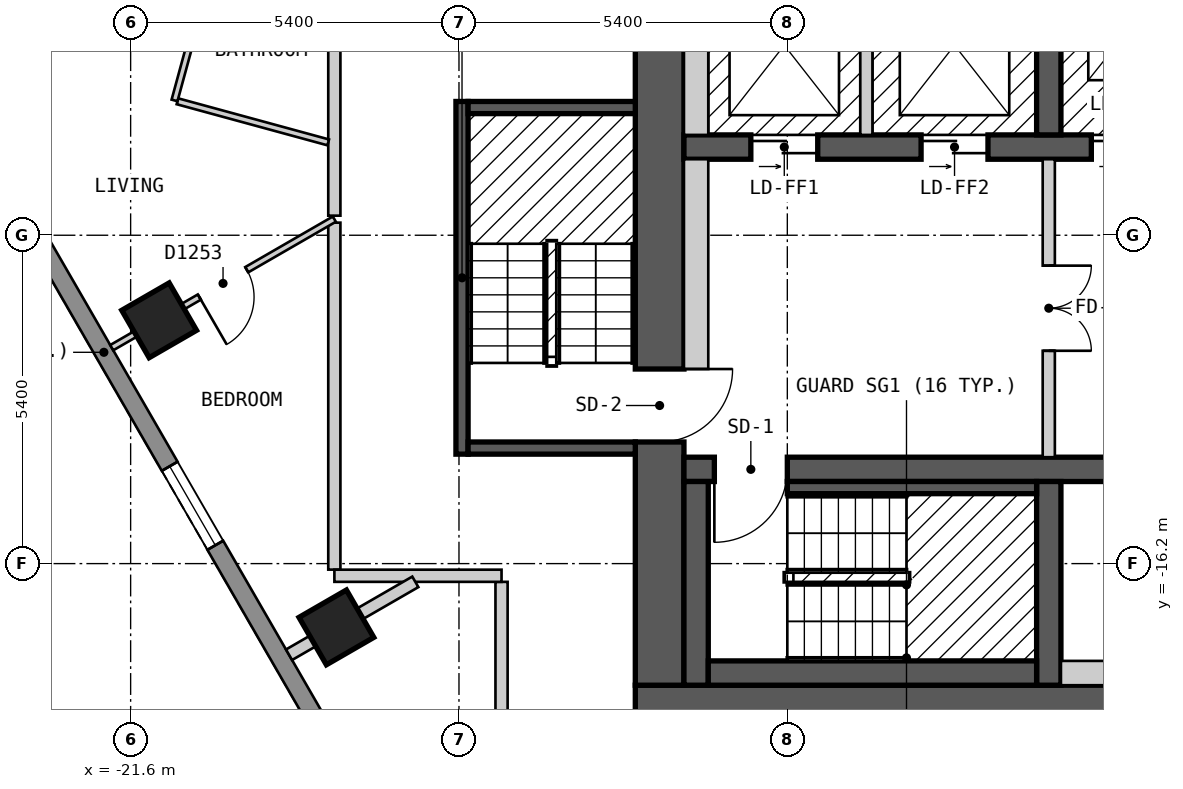
"""IFC4 building model, lengths in metres.
Left out: names, types, materials, properties, quantities, classifications, styles, units other than length and angle.
Written with IfcOpenShell. Run it as: python <this file> out.ifc"""

import sys

from ifc_helpers import new_model, si_unit, direction, frame, frame_2d, origin, origin_2d, place, context, subcontext, project, spatial, polyline, rectangle, outline, extrude, element, fill, save


model = new_model("IFC4")
c1 = context("Model", 3, precision=1e-05, world=origin(), true_north=direction((0.0, 1.0)))
c2 = subcontext(c1, "Body", "Model", "MODEL_VIEW")
j1 = project(units=[si_unit("LENGTHUNIT", "METRE"), si_unit("PLANEANGLEUNIT", "RADIAN")], contexts=[c1])
p1 = place(None, origin())
s1 = spatial("IfcSite", under=j1, at=p1, CompositionType="ELEMENT")
p2 = place(p1, origin())
s2 = spatial("IfcBuilding", under=s1, at=p2, CompositionType="ELEMENT")
p3 = place(p2, frame((0.0, 0.0, 129.6)))
s3 = spatial("IfcBuildingStorey", under=s2, at=p3, CompositionType="ELEMENT", Elevation=129.6)
for number, where, z_axis, x_axis in (
    (1, (-21.131, -12.199, 0.0), (0.0, 0.0, 1.0), (0.5, -0.866, 0.0)),
    (2, (-18.216, -17.249, 0.0), (0.0, 0.0, 1.0), (0.5, -0.866, 0.0)),
):
    element("IfcColumn", number, at=place(p3, frame(where, z_axis=z_axis, x_axis=x_axis)), inside=s3, PredefinedType="COLUMN", context=c2, shape_type="SweptSolid", body=[
        extrude(rectangle(XDim=0.9, YDim=0.9, at=origin_2d()), origin(), (0.0, 0.0, 1.0), 3.0),
    ])
p4 = place(p3, frame((-13.3, -18.6, 0.0), z_axis=(0.0, 0.0, 1.0), x_axis=(1.0, 0.0, 0.0)))
e3 = element("IfcWall", 3, at=p4, inside=s3, PredefinedType="SHEAR", context=c2, shape_type="SweptSolid", body=[
    extrude(rectangle(XDim=26.6, YDim=0.8, at=frame_2d((13.3, 0.0))), origin(), (0.0, 0.0, 1.0), 2.7),
])
p5 = place(p3, frame((-12.9, -18.2, 0.0), z_axis=(0.0, 0.0, 1.0), x_axis=(0.0, 1.0, 0.0)))
e4 = element("IfcWall", 4, at=p5, inside=s3, PredefinedType="SHEAR", context=c2, shape_type="SweptSolid", body=[
    extrude(rectangle(XDim=12.4, YDim=0.8, at=frame_2d((6.2, 0.0))), origin(), (0.0, 0.0, 1.0), 2.7),
])
p6 = place(p5, frame((4.0, 0.0, 0.0)))
e5 = element("IfcOpeningElement", 5, at=p6, cuts=e4, PredefinedType="OPENING", context=c2, shape_type="SweptSolid", body=[
    extrude(rectangle(XDim=1.2, YDim=2.1, at=frame_2d((0.6, 1.05))), frame((0.0, 0.41, 0.0), z_axis=(0.0, -1.0, 0.0), x_axis=(1.0, 0.0, 0.0)), (0.0, 0.0, 1.0), 0.82),
])
p7 = place(p3, frame((-12.5, -14.65, 0.0), z_axis=(0.0, 0.0, 1.0), x_axis=(1.0, 0.0, 0.0)))
e6 = element("IfcWall", 6, at=p7, inside=s3, PredefinedType="SHEAR", context=c2, shape_type="SweptSolid", body=[
    extrude(rectangle(XDim=25.0, YDim=0.4, at=frame_2d((12.5, 0.0))), origin(), (0.0, 0.0, 1.0), 2.7),
])
p8 = place(p7, frame((1.7, 0.0, 0.0), z_axis=(0.0, 0.0, 1.0), x_axis=(-1.0, 0.0, 0.0)))
e7 = element("IfcOpeningElement", 7, at=p8, cuts=e6, PredefinedType="OPENING", context=c2, shape_type="SweptSolid", body=[
    extrude(rectangle(XDim=1.2, YDim=2.1, at=frame_2d((0.6, 1.05))), frame((0.0, 0.21, 0.0), z_axis=(0.0, -1.0, 0.0), x_axis=(1.0, 0.0, 0.0)), (0.0, 0.0, 1.0), 0.42),
])
p9 = place(p7, frame((24.55, 0.0, 0.0), z_axis=(0.0, 0.0, 1.0), x_axis=(-1.0, 0.0, 0.0)))
e8 = element("IfcOpeningElement", 8, at=p9, cuts=e6, PredefinedType="OPENING", context=c2, shape_type="SweptSolid", body=[
    extrude(rectangle(XDim=1.2, YDim=2.1, at=frame_2d((0.6, 1.05))), frame((0.0, 0.21, 0.0), z_axis=(0.0, -1.0, 0.0), x_axis=(1.0, 0.0, 0.0)), (0.0, 0.0, 1.0), 0.42),
])
p10 = place(p7, frame((8.4, 0.0, 0.0), z_axis=(0.0, 0.0, 1.0), x_axis=(-1.0, 0.0, 0.0)))
e9 = element("IfcOpeningElement", 9, at=p10, cuts=e6, PredefinedType="OPENING", context=c2, shape_type="SweptSolid", body=[
    extrude(rectangle(XDim=1.0, YDim=2.1, at=frame_2d((0.5, 1.05))), frame((0.0, 0.21, 0.0), z_axis=(0.0, -1.0, 0.0), x_axis=(1.0, 0.0, 0.0)), (0.0, 0.0, 1.0), 0.42),
])
p11 = place(p7, frame((11.15, 0.0, 0.0), z_axis=(0.0, 0.0, 1.0), x_axis=(-1.0, 0.0, 0.0)))
e10 = element("IfcOpeningElement", 10, at=p11, cuts=e6, PredefinedType="OPENING", context=c2, shape_type="SweptSolid", body=[
    extrude(rectangle(XDim=0.9, YDim=2.1, at=frame_2d((0.45, 1.05))), frame((0.0, 0.21, 0.0), z_axis=(0.0, -1.0, 0.0), x_axis=(1.0, 0.0, 0.0)), (0.0, 0.0, 1.0), 0.42),
])
p12 = place(p7, frame((13.95, 0.0, 0.0), z_axis=(0.0, 0.0, 1.0), x_axis=(-1.0, 0.0, 0.0)))
e11 = element("IfcOpeningElement", 11, at=p12, cuts=e6, PredefinedType="OPENING", context=c2, shape_type="SweptSolid", body=[
    extrude(rectangle(XDim=1.0, YDim=2.1, at=frame_2d((0.5, 1.05))), frame((0.0, 0.21, 0.0), z_axis=(0.0, -1.0, 0.0), x_axis=(1.0, 0.0, 0.0)), (0.0, 0.0, 1.0), 0.42),
])
p13 = place(p7, frame((17.55, 0.0, 0.0), z_axis=(0.0, 0.0, 1.0), x_axis=(-1.0, 0.0, 0.0)))
e12 = element("IfcOpeningElement", 12, at=p13, cuts=e6, PredefinedType="OPENING", context=c2, shape_type="SweptSolid", body=[
    extrude(rectangle(XDim=1.0, YDim=2.1, at=frame_2d((0.5, 1.05))), frame((0.0, 0.21, 0.0), z_axis=(0.0, -1.0, 0.0), x_axis=(1.0, 0.0, 0.0)), (0.0, 0.0, 1.0), 0.42),
])
p14 = place(p3, frame((-12.5, -9.35, 0.0), z_axis=(0.0, 0.0, 1.0), x_axis=(1.0, 0.0, 0.0)))
e13 = element("IfcWall", 13, at=p14, inside=s3, PredefinedType="SHEAR", context=c2, shape_type="SweptSolid", body=[
    extrude(rectangle(XDim=22.7, YDim=0.4, at=frame_2d((11.35, 0.0))), origin(), (0.0, 0.0, 1.0), 2.7),
])
p15 = place(p14, frame((1.1, 0.0, 0.0)))
e14 = element("IfcOpeningElement", 14, at=p15, cuts=e13, PredefinedType="OPENING", context=c2, shape_type="SweptSolid", body=[
    extrude(rectangle(XDim=1.1, YDim=2.1, at=frame_2d((0.55, 1.05))), frame((0.0, 0.21, 0.0), z_axis=(0.0, -1.0, 0.0), x_axis=(1.0, 0.0, 0.0)), (0.0, 0.0, 1.0), 0.42),
])
p16 = place(p14, frame((3.9, 0.0, 0.0)))
e15 = element("IfcOpeningElement", 15, at=p16, cuts=e13, PredefinedType="OPENING", context=c2, shape_type="SweptSolid", body=[
    extrude(rectangle(XDim=1.1, YDim=2.1, at=frame_2d((0.55, 1.05))), frame((0.0, 0.21, 0.0), z_axis=(0.0, -1.0, 0.0), x_axis=(1.0, 0.0, 0.0)), (0.0, 0.0, 1.0), 0.42),
])
p17 = place(p14, frame((6.7, 0.0, 0.0)))
e16 = element("IfcOpeningElement", 16, at=p17, cuts=e13, PredefinedType="OPENING", context=c2, shape_type="SweptSolid", body=[
    extrude(rectangle(XDim=1.1, YDim=2.1, at=frame_2d((0.55, 1.05))), frame((0.0, 0.21, 0.0), z_axis=(0.0, -1.0, 0.0), x_axis=(1.0, 0.0, 0.0)), (0.0, 0.0, 1.0), 0.42),
])
p18 = place(p14, frame((9.0, 0.0, 0.0)))
e17 = element("IfcOpeningElement", 17, at=p18, cuts=e13, PredefinedType="OPENING", context=c2, shape_type="SweptSolid", body=[
    extrude(rectangle(XDim=1.1, YDim=2.1, at=frame_2d((0.55, 1.05))), frame((0.0, 0.21, 0.0), z_axis=(0.0, -1.0, 0.0), x_axis=(1.0, 0.0, 0.0)), (0.0, 0.0, 1.0), 0.42),
])
p19 = place(p14, frame((11.3, 0.0, 0.0)))
e18 = element("IfcOpeningElement", 18, at=p19, cuts=e13, PredefinedType="OPENING", context=c2, shape_type="SweptSolid", body=[
    extrude(rectangle(XDim=1.1, YDim=2.1, at=frame_2d((0.55, 1.05))), frame((0.0, 0.21, 0.0), z_axis=(0.0, -1.0, 0.0), x_axis=(1.0, 0.0, 0.0)), (0.0, 0.0, 1.0), 0.42),
])
p20 = place(p14, frame((13.6, 0.0, 0.0)))
e19 = element("IfcOpeningElement", 19, at=p20, cuts=e13, PredefinedType="OPENING", context=c2, shape_type="SweptSolid", body=[
    extrude(rectangle(XDim=1.1, YDim=2.1, at=frame_2d((0.55, 1.05))), frame((0.0, 0.21, 0.0), z_axis=(0.0, -1.0, 0.0), x_axis=(1.0, 0.0, 0.0)), (0.0, 0.0, 1.0), 0.42),
])
p21 = place(p14, frame((15.9, 0.0, 0.0)))
e20 = element("IfcOpeningElement", 20, at=p21, cuts=e13, PredefinedType="OPENING", context=c2, shape_type="SweptSolid", body=[
    extrude(rectangle(XDim=1.1, YDim=2.1, at=frame_2d((0.55, 1.05))), frame((0.0, 0.21, 0.0), z_axis=(0.0, -1.0, 0.0), x_axis=(1.0, 0.0, 0.0)), (0.0, 0.0, 1.0), 0.42),
])
p22 = place(p14, frame((18.2, 0.0, 0.0)))
e21 = element("IfcOpeningElement", 21, at=p22, cuts=e13, PredefinedType="OPENING", context=c2, shape_type="SweptSolid", body=[
    extrude(rectangle(XDim=1.1, YDim=2.1, at=frame_2d((0.55, 1.05))), frame((0.0, 0.21, 0.0), z_axis=(0.0, -1.0, 0.0), x_axis=(1.0, 0.0, 0.0)), (0.0, 0.0, 1.0), 0.42),
])
p23 = place(p14, frame((20.6, 0.0, 0.0)))
e22 = element("IfcOpeningElement", 22, at=p23, cuts=e13, PredefinedType="OPENING", context=c2, shape_type="SweptSolid", body=[
    extrude(rectangle(XDim=1.1, YDim=2.1, at=frame_2d((0.55, 1.05))), frame((0.0, 0.21, 0.0), z_axis=(0.0, -1.0, 0.0), x_axis=(1.0, 0.0, 0.0)), (0.0, 0.0, 1.0), 0.42),
])
for number, where, z_axis, x_axis in (
    (23, (-6.5, -18.2, 0.0), (0.0, 0.0, 1.0), (0.0, 1.0, 0.0)),
    (24, (-6.5, -9.15, 0.0), (0.0, 0.0, 1.0), (0.0, 1.0, 0.0)),
):
    element("IfcWall", number, at=place(p3, frame(where, z_axis=z_axis, x_axis=x_axis)), inside=s3, PredefinedType="SHEAR", context=c2, shape_type="SweptSolid", body=[
        extrude(rectangle(XDim=3.35, YDim=0.4, at=frame_2d((1.675, 0.0))), origin(), (0.0, 0.0, 1.0), 2.7),
    ])
p24 = place(p3, frame((-28.218, -2.025, 0.0), z_axis=(0.0, 0.0, 1.0), x_axis=(0.500017503135, -0.866015298109, 0.0)))
e25 = element("IfcWall", 25, at=p24, inside=s3, PredefinedType="SOLIDWALL", context=c2, shape_type="SweptSolid", body=[
    extrude(outline(polyline([(0.0, -0.15), (24.711, -0.15), (24.631, 0.15), (0.08, 0.15), (0.0, -0.15)])), origin(), (0.0, 0.0, 1.0), 2.7),
])
p25 = place(p24, frame((2.857, 0.0, 0.15)))
e26 = element("IfcOpeningElement", 26, at=p25, cuts=e25, PredefinedType="OPENING", context=c2, shape_type="SweptSolid", body=[
    extrude(rectangle(XDim=1.5, YDim=2.1, at=frame_2d((0.75, 1.05))), frame((0.0, 0.16, 0.0), z_axis=(0.0, -1.0, 0.0), x_axis=(1.0, 0.0, 0.0)), (0.0, 0.0, 1.0), 0.32),
])
p26 = place(p24, frame((8.689, 0.0, 0.15)))
e27 = element("IfcOpeningElement", 27, at=p26, cuts=e25, PredefinedType="OPENING", context=c2, shape_type="SweptSolid", body=[
    extrude(rectangle(XDim=1.5, YDim=2.1, at=frame_2d((0.75, 1.05))), frame((0.0, 0.16, 0.0), z_axis=(0.0, -1.0, 0.0), x_axis=(1.0, 0.0, 0.0)), (0.0, 0.0, 1.0), 0.32),
])
p27 = place(p24, frame((14.52, 0.0, 0.15)))
e28 = element("IfcOpeningElement", 28, at=p27, cuts=e25, PredefinedType="OPENING", context=c2, shape_type="SweptSolid", body=[
    extrude(rectangle(XDim=1.5, YDim=2.1, at=frame_2d((0.75, 1.05))), frame((0.0, 0.16, 0.0), z_axis=(0.0, -1.0, 0.0), x_axis=(1.0, 0.0, 0.0)), (0.0, 0.0, 1.0), 0.32),
])
p28 = place(p24, frame((20.351, 0.0, 0.15)))
e29 = element("IfcOpeningElement", 29, at=p28, cuts=e25, PredefinedType="OPENING", context=c2, shape_type="SweptSolid", body=[
    extrude(rectangle(XDim=1.5, YDim=2.1, at=frame_2d((0.75, 1.05))), frame((0.0, 0.16, 0.0), z_axis=(0.0, -1.0, 0.0), x_axis=(1.0, 0.0, 0.0)), (0.0, 0.0, 1.0), 0.32),
])
p29 = place(p3, frame((-15.5, -16.5, 0.0), z_axis=(0.0, 0.0, 1.0), x_axis=(0.0, -1.0, 0.0)))
e30 = element("IfcWall", 30, at=p29, inside=s3, PredefinedType="PARTITIONING", context=c2, shape_type="SweptSolid", body=[
    extrude(rectangle(XDim=4.599, YDim=0.2, at=frame_2d((2.3, 0.0))), origin(), (0.0, 0.0, 1.0), 2.7),
])
p30 = place(p3, frame((-18.25, -10.593, 0.0), z_axis=(0.0, 0.0, 1.0), x_axis=(0.0, -1.0, 0.0)))
e31 = element("IfcWall", 31, at=p30, inside=s3, PredefinedType="PARTITIONING", context=c2, shape_type="SweptSolid", body=[
    extrude(rectangle(XDim=5.706, YDim=0.2, at=frame_2d((2.853, 0.0))), origin(), (0.0, 0.0, 1.0), 2.7),
])
p31 = place(p3, frame((-18.249, -16.4, 0.0), z_axis=(0.0, 0.0, 1.0), x_axis=(1.0, 0.0, 0.0)))
e32 = element("IfcWall", 32, at=p31, inside=s3, PredefinedType="PARTITIONING", context=c2, shape_type="SweptSolid", body=[
    extrude(rectangle(XDim=2.749, YDim=0.2, at=frame_2d((1.375, 0.0))), origin(), (0.0, 0.0, 1.0), 2.7),
])
p32 = place(p3, frame((-18.25, -10.478, 0.0), z_axis=(0.0, 0.0, 1.0), x_axis=(0.0, 1.0, 0.0)))
e33 = element("IfcWall", 33, at=p32, inside=s3, PredefinedType="PARTITIONING", context=c2, shape_type="SweptSolid", body=[
    extrude(rectangle(XDim=3.878, YDim=0.2, at=frame_2d((1.939, 0.0))), origin(), (0.0, 0.0, 1.0), 2.7),
])
p33 = place(p3, frame((-20.83, -8.597, 0.0), z_axis=(0.0, 0.0, 1.0), x_axis=(0.964796691053, -0.262996853468, 0.0)))
e34 = element("IfcWall", 34, at=p33, inside=s3, PredefinedType="PARTITIONING", context=c2, shape_type="SweptSolid", body=[
    extrude(rectangle(XDim=2.571, YDim=0.1, at=frame_2d((1.285, 0.0))), origin(), (0.0, 0.0, 1.0), 2.7),
])
p34 = place(p3, frame((-20.878, -8.583, 0.0), z_axis=(0.0, 0.0, 1.0), x_axis=(0.263144077993, 0.964756546605, 0.0)))
e35 = element("IfcWall", 35, at=p34, inside=s3, PredefinedType="PARTITIONING", context=c2, shape_type="SweptSolid", body=[
    extrude(rectangle(XDim=3.873, YDim=0.1, at=frame_2d((1.936, 0.0))), origin(), (0.0, 0.0, 1.0), 2.7),
])
p35 = place(p34, frame((2.552, 0.0, 0.0)))
e36 = element("IfcOpeningElement", 36, at=p35, cuts=e35, PredefinedType="OPENING", context=c2, shape_type="SweptSolid", body=[
    extrude(rectangle(XDim=0.9, YDim=2.1, at=frame_2d((0.45, 1.05))), frame((0.0, 0.06, 0.0), z_axis=(0.0, -1.0, 0.0), x_axis=(1.0, 0.0, 0.0)), (0.0, 0.0, 1.0), 0.12),
])
p36 = place(p3, frame((-21.911, -12.649, 0.0), z_axis=(0.0, 0.0, 1.0), x_axis=(0.865984571374, 0.500070717141, 0.0)))
e37 = element("IfcWall", 37, at=p36, inside=s3, PredefinedType="PARTITIONING", context=c2, shape_type="SweptSolid", body=[
    extrude(rectangle(XDim=4.228, YDim=0.1, at=frame_2d((2.114, 0.0))), origin(), (0.0, 0.0, 1.0), 2.7),
])
p37 = place(p36, frame((1.664, 0.0, 0.0)))
e38 = element("IfcOpeningElement", 38, at=p37, cuts=e37, PredefinedType="OPENING", context=c2, shape_type="SweptSolid", body=[
    extrude(rectangle(XDim=0.9, YDim=2.1, at=frame_2d((0.45, 1.05))), frame((0.0, 0.06, 0.0), z_axis=(0.0, -1.0, 0.0), x_axis=(1.0, 0.0, 0.0)), (0.0, 0.0, 1.0), 0.12),
])
p38 = place(p3, frame((-18.995, -17.699, 0.0), z_axis=(0.0, 0.0, 1.0), x_axis=(0.86607371389, 0.499916315105, 0.0)))
e39 = element("IfcWall", 39, at=p38, inside=s3, PredefinedType="PARTITIONING", context=c2, shape_type="SweptSolid", body=[
    extrude(rectangle(XDim=2.398, YDim=0.2, at=frame_2d((1.199, 0.0))), origin(), (0.0, 0.0, 1.0), 2.7),
])
p39 = place(p3, frame((-16.15, -14.4, 0.0), z_axis=(0.0, 0.0, 1.0), x_axis=(0.0, 1.0, 0.0)))
e40 = element("IfcWall", 40, at=p39, inside=s3, PredefinedType="SOLIDWALL", context=c2, shape_type="SweptSolid", body=[
    extrude(rectangle(XDim=5.8, YDim=0.2, at=frame_2d((2.9, 0.0))), origin(), (0.0, 0.0, 1.0), 2.7),
])
for number, where, z_axis, x_axis in (
    (41, (-16.05, -14.3, 0.0), (0.0, 0.0, 1.0), (1.0, 0.0, 0.0)),
    (42, (-16.05, -8.7, 0.0), (0.0, 0.0, 1.0), (1.0, 0.0, 0.0)),
):
    element("IfcWall", number, at=place(p3, frame(where, z_axis=z_axis, x_axis=x_axis)), inside=s3, PredefinedType="SOLIDWALL", context=c2, shape_type="SweptSolid", body=[
        extrude(rectangle(XDim=2.75, YDim=0.2, at=frame_2d((1.375, 0.0))), origin(), (0.0, 0.0, 1.0), 2.7),
    ])
p40 = place(p3, frame((-12.3, -18.2, 0.0), z_axis=(0.0, 0.0, 1.0), x_axis=(0.0, 1.0, 0.0)))
e43 = element("IfcWall", 43, at=p40, inside=s3, PredefinedType="SOLIDWALL", context=c2, shape_type="SweptSolid", body=[
    extrude(rectangle(XDim=3.35, YDim=0.4, at=frame_2d((1.675, 0.0))), origin(), (0.0, 0.0, 1.0), 2.7),
])
p41 = place(p3, frame((-12.3, -13.0, 0.0), z_axis=(0.0, 0.0, 1.0), x_axis=(0.0, 1.0, 0.0)))
e44 = element("IfcWall", 44, at=p41, inside=s3, PredefinedType="PARTITIONING", context=c2, shape_type="SweptSolid", body=[
    extrude(rectangle(XDim=3.45, YDim=0.4, at=frame_2d((1.725, 0.0))), origin(), (0.0, 0.0, 1.0), 2.7),
])
p42 = place(p3, frame((-12.3, -9.15, 0.0), z_axis=(0.0, 0.0, 1.0), x_axis=(0.0, 1.0, 0.0)))
e45 = element("IfcWall", 45, at=p42, inside=s3, PredefinedType="SOLIDWALL", context=c2, shape_type="SweptSolid", body=[
    extrude(rectangle(XDim=3.35, YDim=0.4, at=frame_2d((1.675, 0.0))), origin(), (0.0, 0.0, 1.0), 2.7),
])
p43 = place(p3, frame((-12.1, -18.0, 0.0), z_axis=(0.0, 0.0, 1.0), x_axis=(1.0, 0.0, 0.0)))
e46 = element("IfcWall", 46, at=p43, inside=s3, PredefinedType="SOLIDWALL", context=c2, shape_type="SweptSolid", body=[
    extrude(rectangle(XDim=5.4, YDim=0.4, at=frame_2d((2.7, 0.0))), origin(), (0.0, 0.0, 1.0), 2.7),
])
p44 = place(p3, frame((-10.8, -14.95, 0.0), z_axis=(0.0, 0.0, 1.0), x_axis=(1.0, 0.0, 0.0)))
e47 = element("IfcWall", 47, at=p44, inside=s3, PredefinedType="SOLIDWALL", context=c2, shape_type="SweptSolid", body=[
    extrude(rectangle(XDim=4.1, YDim=0.2, at=frame_2d((2.05, 0.0))), origin(), (0.0, 0.0, 1.0), 2.7),
])
p45 = place(p3, frame((-9.5, -9.15, 0.0), z_axis=(0.0, 0.0, 1.0), x_axis=(0.0, 1.0, 0.0)))
e48 = element("IfcWall", 48, at=p45, inside=s3, PredefinedType="SOLIDWALL", context=c2, shape_type="SweptSolid", body=[
    extrude(rectangle(XDim=2.95, YDim=0.2, at=frame_2d((1.475, 0.0))), origin(), (0.0, 0.0, 1.0), 2.7),
])
p46 = place(p3, frame((-6.5, -14.45, 0.0), z_axis=(0.0, 0.0, 1.0), x_axis=(0.0, 1.0, 0.0)))
e49 = element("IfcWall", 49, at=p46, inside=s3, PredefinedType="PARTITIONING", context=c2, shape_type="SweptSolid", body=[
    extrude(rectangle(XDim=4.9, YDim=0.2, at=frame_2d((2.45, 0.0))), origin(), (0.0, 0.0, 1.0), 2.7),
])
p47 = place(p46, frame((3.15, 0.0, 0.0), z_axis=(0.0, 0.0, 1.0), x_axis=(-1.0, 0.0, 0.0)))
e50 = element("IfcOpeningElement", 50, at=p47, cuts=e49, PredefinedType="OPENING", context=c2, shape_type="SweptSolid", body=[
    extrude(rectangle(XDim=1.4, YDim=2.1, at=frame_2d((0.7, 1.05))), frame((0.0, 0.11, 0.0), z_axis=(0.0, -1.0, 0.0), x_axis=(1.0, 0.0, 0.0)), (0.0, 0.0, 1.0), 0.22),
])
p48 = place(p3, frame((-6.3, -18.0, 0.0), z_axis=(0.0, 0.0, 1.0), x_axis=(1.0, 0.0, 0.0)))
e51 = element("IfcWall", 51, at=p48, inside=s3, PredefinedType="PARTITIONING", context=c2, shape_type="SweptSolid", body=[
    extrude(rectangle(XDim=12.6, YDim=0.4, at=frame_2d((6.3, 0.0))), origin(), (0.0, 0.0, 1.0), 2.7),
])
p49 = place(p27, origin())
e52 = element("IfcWindow", 52, at=p49, inside=s3, PartitioningType="SINGLE_PANEL", PredefinedType="WINDOW", context=c2, shape_type="SweptSolid", body=[
    extrude(rectangle(XDim=1.5, YDim=2.1, at=frame_2d((0.75, 1.05))), frame((0.0, 0.03, 0.0), z_axis=(0.0, -1.0, 0.0), x_axis=(1.0, 0.0, 0.0)), (0.0, 0.0, 1.0), 0.06),
])
fill(e28, e52)
p50 = place(p37, origin())
e53 = element("IfcDoor", 53, at=p50, inside=s3, OperationType="SINGLE_SWING_LEFT", PredefinedType="DOOR", context=c2, shape_type="SweptSolid", body=[
    extrude(rectangle(XDim=0.9, YDim=2.1, at=frame_2d((0.45, 1.05))), frame((0.0, 0.025, 0.0), z_axis=(0.0, -1.0, 0.0), x_axis=(1.0, 0.0, 0.0)), (0.0, 0.0, 1.0), 0.05),
])
fill(e38, e53)
p51 = place(p15, origin())
e54 = element("IfcDoor", 54, at=p51, inside=s3, OperationType="DOUBLE_DOOR_SLIDING", PredefinedType="DOOR", context=c2, shape_type="SweptSolid", body=[
    extrude(rectangle(XDim=1.1, YDim=2.1, at=frame_2d((0.55, 1.05))), frame((0.0, 0.025, 0.0), z_axis=(0.0, -1.0, 0.0), x_axis=(1.0, 0.0, 0.0)), (0.0, 0.0, 1.0), 0.05),
])
fill(e14, e54)
p52 = place(p16, origin())
e55 = element("IfcDoor", 55, at=p52, inside=s3, OperationType="DOUBLE_DOOR_SLIDING", PredefinedType="DOOR", context=c2, shape_type="SweptSolid", body=[
    extrude(rectangle(XDim=1.1, YDim=2.1, at=frame_2d((0.55, 1.05))), frame((0.0, 0.025, 0.0), z_axis=(0.0, -1.0, 0.0), x_axis=(1.0, 0.0, 0.0)), (0.0, 0.0, 1.0), 0.05),
])
fill(e15, e55)
p53 = place(p17, origin())
e56 = element("IfcDoor", 56, at=p53, inside=s3, OperationType="DOUBLE_DOOR_SLIDING", PredefinedType="DOOR", context=c2, shape_type="SweptSolid", body=[
    extrude(rectangle(XDim=1.1, YDim=2.1, at=frame_2d((0.55, 1.05))), frame((0.0, 0.025, 0.0), z_axis=(0.0, -1.0, 0.0), x_axis=(1.0, 0.0, 0.0)), (0.0, 0.0, 1.0), 0.05),
])
fill(e16, e56)
p54 = place(p8, origin())
e57 = element("IfcDoor", 57, at=p54, inside=s3, OperationType="SINGLE_SWING_RIGHT", PredefinedType="DOOR", context=c2, shape_type="SweptSolid", body=[
    extrude(rectangle(XDim=1.2, YDim=2.1, at=frame_2d((0.6, 1.05))), frame((0.0, 0.025, 0.0), z_axis=(0.0, -1.0, 0.0), x_axis=(1.0, 0.0, 0.0)), (0.0, 0.0, 1.0), 0.05),
])
fill(e7, e57)
p55 = place(p6, origin())
e58 = element("IfcDoor", 58, at=p55, inside=s3, OperationType="SINGLE_SWING_RIGHT", PredefinedType="DOOR", context=c2, shape_type="SweptSolid", body=[
    extrude(rectangle(XDim=1.2, YDim=2.1, at=frame_2d((0.6, 1.05))), frame((0.0, 0.025, 0.0), z_axis=(0.0, -1.0, 0.0), x_axis=(1.0, 0.0, 0.0)), (0.0, 0.0, 1.0), 0.05),
])
fill(e5, e58)
p56 = place(p47, origin())
e59 = element("IfcDoor", 59, at=p56, inside=s3, OperationType="DOUBLE_DOOR_SINGLE_SWING", PredefinedType="DOOR", context=c2, shape_type="SweptSolid", body=[
    extrude(rectangle(XDim=1.4, YDim=2.1, at=frame_2d((0.7, 1.05))), frame((0.0, 0.025, 0.0), z_axis=(0.0, -1.0, 0.0), x_axis=(1.0, 0.0, 0.0)), (0.0, 0.0, 1.0), 0.05),
])
fill(e50, e59)
save(model, sys.argv[1])
